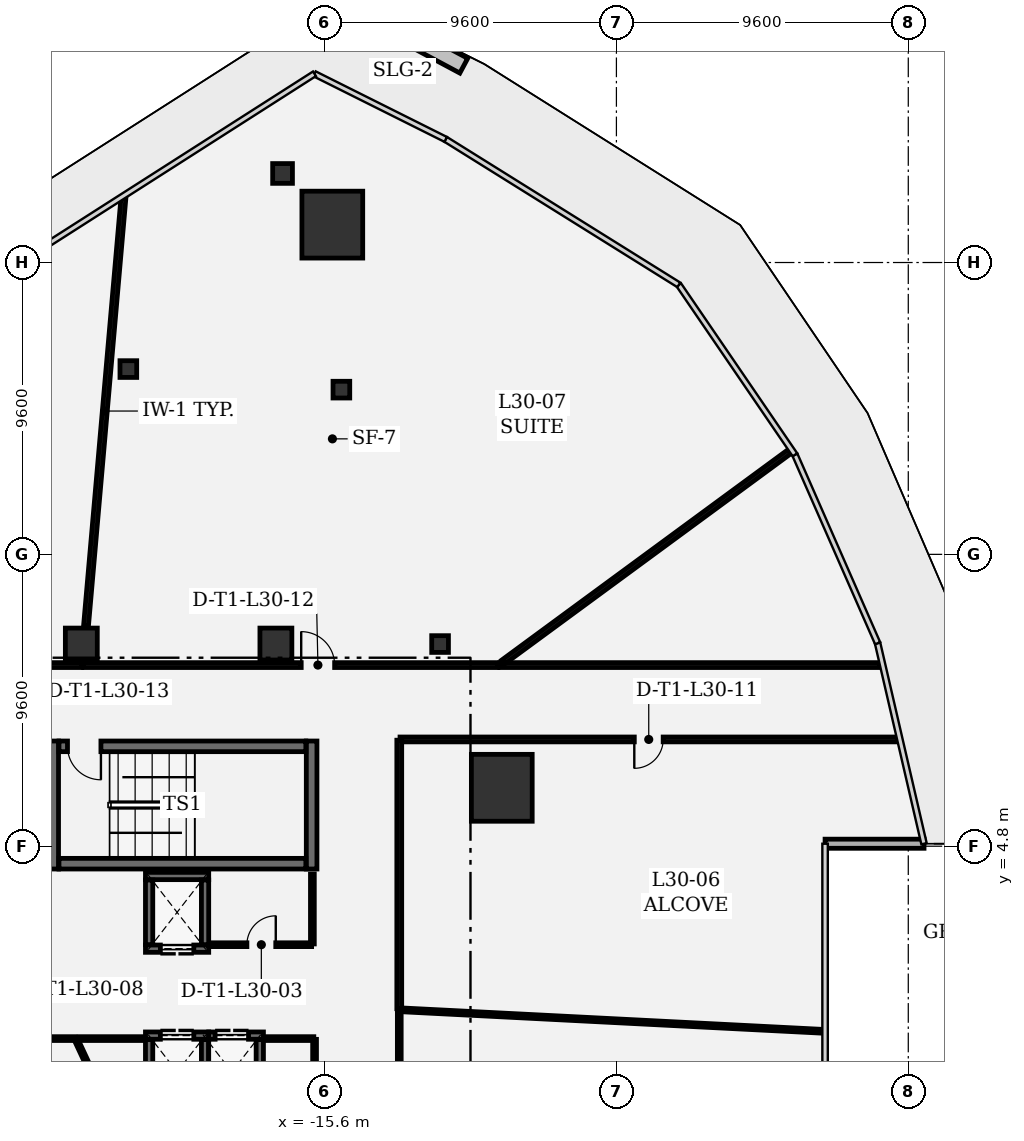
"""IFC4 building model, lengths in metres.
Left out: names, types, materials, properties, quantities, classifications, styles, units other than length and angle.
Written with IfcOpenShell. Run it as: python <this file> out.ifc"""

import sys

from ifc_helpers import new_model, si_unit, direction, frame, frame_2d, origin, origin_2d, place, context, subcontext, project, spatial, rectangle, extrude, element, fill, save


model = new_model("IFC4")
c1 = context("Model", 3, precision=1e-05, world=origin(), true_north=direction((0.0, 1.0)))
c2 = subcontext(c1, "Body", "Model", "MODEL_VIEW")
j1 = project(units=[si_unit("LENGTHUNIT", "METRE"), si_unit("PLANEANGLEUNIT", "RADIAN")], contexts=[c1])
p1 = place(None, origin())
s1 = spatial("IfcSite", under=j1, at=p1, CompositionType="ELEMENT")
p2 = place(p1, origin())
s2 = spatial("IfcBuilding", under=s1, at=p2, CompositionType="ELEMENT")
p3 = place(p2, frame((0.0, 0.0, 134.1)))
s3 = spatial("IfcBuildingStorey", under=s2, at=p3, CompositionType="ELEMENT", Elevation=134.1)
for number, where, z_axis, x_axis in (
    (1, (-9.77, 6.721, 0.0), (0.0, 0.0, 1.0), (1.0, 0.0, 0.0)),
    (2, (-15.344, 25.246, 0.0), (0.0, 0.0, 1.0), (1.0, 0.0, 0.0)),
):
    element("IfcColumn", number, at=place(p3, frame(where, z_axis=z_axis, x_axis=x_axis)), inside=s3, PredefinedType="COLUMN", context=c2, shape_type="SweptSolid", body=[
        extrude(rectangle(XDim=2.0, YDim=2.2, at=origin_2d()), origin(), (0.0, 0.0, 1.0), 4.05),
    ])
for number, where, z_axis, x_axis in (
    (3, (-23.6, 11.45, 0.0), (0.0, 0.0, 1.0), (1.0, 0.0, 0.0)),
    (4, (-17.2, 11.45, 0.0), (0.0, 0.0, 1.0), (1.0, 0.0, 0.0)),
):
    element("IfcColumn", number, at=place(p3, frame(where, z_axis=z_axis, x_axis=x_axis)), inside=s3, PredefinedType="COLUMN", context=c2, shape_type="SweptSolid", body=[
        extrude(rectangle(XDim=1.05, YDim=1.05, at=origin_2d()), origin(), (0.0, 0.0, 1.0), 4.05),
    ])
p4 = place(p3, frame((-16.981, 26.929, 0.0), z_axis=(0.0, 0.0, 1.0), x_axis=(1.0, 0.0, 0.0)))
e5 = element("IfcColumn", 5, at=p4, inside=s3, PredefinedType="COLUMN", context=c2, shape_type="SweptSolid", body=[
    extrude(rectangle(XDim=0.65, YDim=0.65, at=origin_2d()), origin(), (0.0, 0.0, 1.0), 4.05),
])
for number, where, z_axis, x_axis in (
    (6, (-22.053, 20.495, 0.0), (0.0, 0.0, 1.0), (1.0, 0.0, 0.0)),
    (7, (-15.046, 19.818, 0.0), (0.0, 0.0, 1.0), (1.0, 0.0, 0.0)),
    (8, (-11.8, 11.45, 0.0), (0.0, 0.0, 1.0), (1.0, 0.0, 0.0)),
):
    element("IfcColumn", number, at=place(p3, frame(where, z_axis=z_axis, x_axis=x_axis)), inside=s3, PredefinedType="COLUMN", context=c2, shape_type="SweptSolid", body=[
        extrude(rectangle(XDim=0.55, YDim=0.55, at=origin_2d()), origin(), (0.0, 0.0, 1.0), 4.05),
    ])
p5 = place(p3, frame((0.863, 4.882, 0.0), z_axis=(0.0, 0.0, 1.0), x_axis=(1.0, 0.0, 0.0)))
e9 = element("IfcWall", 9, at=p5, inside=s3, PredefinedType="SOLIDWALL", context=c2, shape_type="SweptSolid", body=[
    extrude(rectangle(XDim=3.254, YDim=0.3, at=frame_2d((1.627, 0.0))), origin(), (0.0, 0.0, 1.0), 3.78),
])
for number, where, z_axis, x_axis in (
    (10, (-24.525, 8.26, 0.0), (0.0, 0.0, 1.0), (0.0, -1.0, 0.0)),
    (11, (-16.025, 4.05, 0.0), (0.0, 0.0, 1.0), (0.0, 1.0, 0.0)),
):
    element("IfcWall", number, at=place(p3, frame(where, z_axis=z_axis, x_axis=x_axis)), inside=s3, PredefinedType="SHEAR", context=c2, shape_type="SweptSolid", body=[
        extrude(rectangle(XDim=4.21, YDim=0.35, at=frame_2d((2.105, 0.0))), origin(), (0.0, 0.0, 1.0), 3.78),
    ])
p6 = place(p3, frame((-24.335, 4.225, 0.0), z_axis=(0.0, 0.0, 1.0), x_axis=(1.0, 0.0, 0.0)))
e12 = element("IfcWall", 12, at=p6, inside=s3, PredefinedType="SHEAR", context=c2, shape_type="SweptSolid", body=[
    extrude(rectangle(XDim=8.12, YDim=0.35, at=frame_2d((4.06, 0.0))), origin(), (0.0, 0.0, 1.0), 3.78),
])
p7 = place(p3, frame((-16.215, 8.085, 0.0), z_axis=(0.0, 0.0, 1.0), x_axis=(-1.0, 0.0, 0.0)))
e13 = element("IfcWall", 13, at=p7, inside=s3, PredefinedType="SHEAR", context=c2, shape_type="SweptSolid", body=[
    extrude(rectangle(XDim=8.12, YDim=0.35, at=frame_2d((4.06, 0.0))), origin(), (0.0, 0.0, 1.0), 3.78),
])
p8 = place(p7, frame((6.74, 0.0, 0.0)))
e14 = element("IfcOpeningElement", 14, at=p8, cuts=e13, PredefinedType="OPENING", context=c2, shape_type="SweptSolid", body=[
    extrude(rectangle(XDim=1.1, YDim=2.2, at=frame_2d((0.55, 1.1))), frame((0.0, 0.185, 0.0), z_axis=(0.0, -1.0, 0.0), x_axis=(1.0, 0.0, 0.0)), (0.0, 0.0, 1.0), 0.37),
])
p9 = place(p3, frame((-19.41, 1.43, 0.0), z_axis=(0.0, 0.0, 1.0), x_axis=(-1.0, 0.0, 0.0)))
e15 = element("IfcWall", 15, at=p9, inside=s3, PredefinedType="SHEAR", context=c2, shape_type="SweptSolid", body=[
    extrude(rectangle(XDim=2.08, YDim=0.24, at=frame_2d((1.04, 0.0))), origin(), (0.0, 0.0, 1.0), 3.78),
])
p10 = place(p9, frame((0.49, 0.0, 0.0)))
e16 = element("IfcOpeningElement", 16, at=p10, cuts=e15, PredefinedType="OPENING", context=c2, shape_type="SweptSolid", body=[
    extrude(rectangle(XDim=1.1, YDim=2.2, at=frame_2d((0.55, 1.1))), frame((0.0, 0.13, 0.0), z_axis=(0.0, -1.0, 0.0), x_axis=(1.0, 0.0, 0.0)), (0.0, 0.0, 1.0), 0.26),
])
p11 = place(p3, frame((-21.49, 3.82, 0.0), z_axis=(0.0, 0.0, 1.0), x_axis=(1.0, 0.0, 0.0)))
e17 = element("IfcWall", 17, at=p11, inside=s3, PredefinedType="SHEAR", context=c2, shape_type="SweptSolid", body=[
    extrude(rectangle(XDim=2.08, YDim=0.24, at=frame_2d((1.04, 0.0))), origin(), (0.0, 0.0, 1.0), 3.78),
])
for number, where, z_axis, x_axis in (
    (18, (-21.37, 1.562, 0.0), (0.0, 0.0, 1.0), (0.0, 1.0, 0.0)),
    (19, (-19.53, 3.688, 0.0), (0.0, 0.0, 1.0), (0.0, -1.0, 0.0)),
):
    element("IfcWall", number, at=place(p3, frame(where, z_axis=z_axis, x_axis=x_axis)), inside=s3, PredefinedType="SHEAR", context=c2, shape_type="SweptSolid", body=[
        extrude(rectangle(XDim=2.126, YDim=0.24, at=frame_2d((1.063, 0.0))), origin(), (0.0, 0.0, 1.0), 3.78),
    ])
p12 = place(p3, frame((-21.49, -1.43, 0.0), z_axis=(0.0, 0.0, 1.0), x_axis=(1.0, 0.0, 0.0)))
e20 = element("IfcWall", 20, at=p12, inside=s3, PredefinedType="SHEAR", context=c2, shape_type="SweptSolid", body=[
    extrude(rectangle(XDim=2.08, YDim=0.24, at=frame_2d((1.04, 0.0))), origin(), (0.0, 0.0, 1.0), 3.78),
])
p13 = place(p12, frame((0.49, 0.0, 0.0)))
e21 = element("IfcOpeningElement", 21, at=p13, cuts=e20, PredefinedType="OPENING", context=c2, shape_type="SweptSolid", body=[
    extrude(rectangle(XDim=1.1, YDim=2.2, at=frame_2d((0.55, 1.1))), frame((0.0, 0.13, 0.0), z_axis=(0.0, -1.0, 0.0), x_axis=(1.0, 0.0, 0.0)), (0.0, 0.0, 1.0), 0.26),
])
for number, where, z_axis, x_axis in (
    (22, (-21.37, -3.688, 0.0), (0.0, 0.0, 1.0), (0.0, 1.0, 0.0)),
    (23, (-19.53, -1.562, 0.0), (0.0, 0.0, 1.0), (0.0, -1.0, 0.0)),
):
    element("IfcWall", number, at=place(p3, frame(where, z_axis=z_axis, x_axis=x_axis)), inside=s3, PredefinedType="SHEAR", context=c2, shape_type="SweptSolid", body=[
        extrude(rectangle(XDim=2.126, YDim=0.24, at=frame_2d((1.063, 0.0))), origin(), (0.0, 0.0, 1.0), 3.78),
    ])
p14 = place(p3, frame((-19.41, -1.43, 0.0), z_axis=(0.0, 0.0, 1.0), x_axis=(1.0, 0.0, 0.0)))
e24 = element("IfcWall", 24, at=p14, inside=s3, PredefinedType="SHEAR", context=c2, shape_type="SweptSolid", body=[
    extrude(rectangle(XDim=1.8, YDim=0.24, at=frame_2d((0.9, 0.0))), origin(), (0.0, 0.0, 1.0), 3.78),
])
p15 = place(p14, frame((0.21, 0.0, 0.0)))
e25 = element("IfcOpeningElement", 25, at=p15, cuts=e24, PredefinedType="OPENING", context=c2, shape_type="SweptSolid", body=[
    extrude(rectangle(XDim=1.1, YDim=2.2, at=frame_2d((0.55, 1.1))), frame((0.0, 0.13, 0.0), z_axis=(0.0, -1.0, 0.0), x_axis=(1.0, 0.0, 0.0)), (0.0, 0.0, 1.0), 0.26),
])
p16 = place(p3, frame((-17.73, -1.562, 0.0), z_axis=(0.0, 0.0, 1.0), x_axis=(0.0, -1.0, 0.0)))
e26 = element("IfcWall", 26, at=p16, inside=s3, PredefinedType="SHEAR", context=c2, shape_type="SweptSolid", body=[
    extrude(rectangle(XDim=2.126, YDim=0.24, at=frame_2d((1.063, 0.0))), origin(), (0.0, 0.0, 1.0), 3.78),
])
p17 = place(p3, frame((-19.334, 1.56, 0.0), z_axis=(0.0, 0.0, 1.0), x_axis=(1.0, 0.0, 0.0)))
e27 = element("IfcWall", 27, at=p17, inside=s3, PredefinedType="PARTITIONING", context=c2, shape_type="SweptSolid", body=[
    extrude(rectangle(XDim=3.309, YDim=0.125, at=frame_2d((1.654, 0.0))), origin(), (0.0, 0.0, 1.0), 3.78),
])
p18 = place(p17, frame((1.179, 0.0, 0.0)))
e28 = element("IfcOpeningElement", 28, at=p18, cuts=e27, PredefinedType="OPENING", context=c2, shape_type="SweptSolid", body=[
    extrude(rectangle(XDim=0.95, YDim=2.15, at=frame_2d((0.475, 1.075))), frame((0.0, 0.073, 0.0), z_axis=(0.0, -1.0, 0.0), x_axis=(1.0, 0.0, 0.0)), (0.0, 0.0, 1.0), 0.145),
])
p19 = place(p3, frame((-16.0, 1.585, 0.0), z_axis=(0.0, 0.0, 1.0), x_axis=(0.0, 1.0, 0.0)))
e29 = element("IfcWall", 29, at=p19, inside=s3, PredefinedType="PARTITIONING", context=c2, shape_type="SweptSolid", body=[
    extrude(rectangle(XDim=2.302, YDim=0.125, at=frame_2d((1.151, 0.0))), origin(), (0.0, 0.0, 1.0), 3.78),
])
p20 = place(p3, frame((-23.584, 10.758, 0.0), z_axis=(0.0, 0.0, 1.0), x_axis=(-1.0, 0.0, 0.0)))
e30 = element("IfcWall", 30, at=p20, inside=s3, PredefinedType="PARTITIONING", context=c2, shape_type="SweptSolid", body=[
    extrude(rectangle(XDim=14.249, YDim=0.16, at=frame_2d((7.125, 0.0))), origin(), (0.0, 0.0, 1.0), 3.344),
])
p21 = place(p20, frame((6.575, 0.0, 0.0)))
e31 = element("IfcOpeningElement", 31, at=p21, cuts=e30, PredefinedType="OPENING", context=c2, shape_type="SweptSolid", body=[
    extrude(rectangle(XDim=1.1, YDim=2.15, at=frame_2d((0.55, 1.075))), frame((0.0, 0.09, 0.0), z_axis=(0.0, -1.0, 0.0), x_axis=(1.0, 0.0, 0.0)), (0.0, 0.0, 1.0), 0.18),
])
p22 = place(p3, frame((-23.447, 12.04, 0.0), z_axis=(0.0, 0.0, 1.0), x_axis=(0.087151517994, 0.996195067701, 0.0)))
e32 = element("IfcWall", 32, at=p22, inside=s3, PredefinedType="PARTITIONING", context=c2, shape_type="SweptSolid", body=[
    extrude(rectangle(XDim=14.13, YDim=0.16, at=frame_2d((7.065, 0.0))), origin(), (0.0, 0.0, 1.0), 2.895),
])
p23 = place(p3, frame((-23.812, -1.528, 0.0), z_axis=(0.0, 0.0, 1.0), x_axis=(-1.0, 0.0, 0.0)))
e33 = element("IfcWall", 33, at=p23, inside=s3, PredefinedType="PARTITIONING", context=c2, shape_type="SweptSolid", body=[
    extrude(rectangle(XDim=2.673, YDim=0.125, at=frame_2d((1.336, 0.0))), origin(), (0.0, 0.0, 1.0), 3.78),
])
p24 = place(p23, frame((0.861, 0.0, 0.0)))
e34 = element("IfcOpeningElement", 34, at=p24, cuts=e33, PredefinedType="OPENING", context=c2, shape_type="SweptSolid", body=[
    extrude(rectangle(XDim=0.95, YDim=2.15, at=frame_2d((0.475, 1.075))), frame((0.0, 0.073, 0.0), z_axis=(0.0, -1.0, 0.0), x_axis=(1.0, 0.0, 0.0)), (0.0, 0.0, 1.0), 0.145),
])
p25 = place(p3, frame((-22.53, -4.224, 0.0), z_axis=(0.0, 0.0, 1.0), x_axis=(-0.422717831819, 0.906261350088, 0.0)))
e35 = element("IfcWall", 35, at=p25, inside=s3, PredefinedType="PARTITIONING", context=c2, shape_type="SweptSolid", body=[
    extrude(rectangle(XDim=2.95, YDim=0.125, at=frame_2d((1.475, 0.0))), origin(), (0.0, 0.0, 1.0), 3.78),
])
p26 = place(p3, frame((0.783, -1.288, 0.0), z_axis=(0.0, 0.0, 1.0), x_axis=(-0.998704516963, 0.050885044939, 0.0)))
e36 = element("IfcWall", 36, at=p26, inside=s3, PredefinedType="PARTITIONING", context=c2, shape_type="SweptSolid", body=[
    extrude(rectangle(XDim=13.919, YDim=0.125, at=frame_2d((6.959, 0.0))), origin(), (0.0, 0.0, 1.0), 3.78),
])
p27 = place(p3, frame((-13.142, -0.604, 0.0), z_axis=(0.0, 0.0, 1.0), x_axis=(0.0, -1.0, 0.0)))
e37 = element("IfcWall", 37, at=p27, inside=s3, PredefinedType="PARTITIONING", context=c2, shape_type="SweptSolid", body=[
    extrude(rectangle(XDim=10.33, YDim=0.125, at=frame_2d((5.165, 0.0))), origin(), (0.0, 0.0, 1.0), 3.78),
])
p28 = place(p27, frame((4.69, 0.0, 0.0)))
e38 = element("IfcOpeningElement", 38, at=p28, cuts=e37, PredefinedType="OPENING", context=c2, shape_type="SweptSolid", body=[
    extrude(rectangle(XDim=0.95, YDim=2.15, at=frame_2d((0.475, 1.075))), frame((0.0, 0.073, 0.0), z_axis=(0.0, -1.0, 0.0), x_axis=(1.0, 0.0, 0.0)), (0.0, 0.0, 1.0), 0.145),
])
p29 = place(p3, frame((-15.928, -4.214, 0.0), z_axis=(0.0, 0.0, 1.0), x_axis=(0.0, 1.0, 0.0)))
e39 = element("IfcWall", 39, at=p29, inside=s3, PredefinedType="PARTITIONING", context=c2, shape_type="SweptSolid", body=[
    extrude(rectangle(XDim=2.661, YDim=0.125, at=frame_2d((1.331, 0.0))), origin(), (0.0, 0.0, 1.0), 3.78),
])
p30 = place(p29, frame((0.855, 0.0, 0.0)))
e40 = element("IfcOpeningElement", 40, at=p30, cuts=e39, PredefinedType="OPENING", context=c2, shape_type="SweptSolid", body=[
    extrude(rectangle(XDim=0.95, YDim=2.15, at=frame_2d((0.475, 1.075))), frame((0.0, 0.073, 0.0), z_axis=(0.0, -1.0, 0.0), x_axis=(1.0, 0.0, 0.0)), (0.0, 0.0, 1.0), 0.145),
])
p31 = place(p3, frame((-15.953, -1.528, 0.0), z_axis=(0.0, 0.0, 1.0), x_axis=(-1.0, 0.0, 0.0)))
e41 = element("IfcWall", 41, at=p31, inside=s3, PredefinedType="PARTITIONING", context=c2, shape_type="SweptSolid", body=[
    extrude(rectangle(XDim=1.532, YDim=0.125, at=frame_2d((0.766, 0.0))), origin(), (0.0, 0.0, 1.0), 3.78),
])
p32 = place(p3, frame((-21.615, -1.528, 0.0), z_axis=(0.0, 0.0, 1.0), x_axis=(-1.0, 0.0, 0.0)))
e42 = element("IfcWall", 42, at=p32, inside=s3, PredefinedType="PARTITIONING", context=c2, shape_type="SweptSolid", body=[
    extrude(rectangle(XDim=2.054, YDim=0.125, at=frame_2d((1.027, 0.0))), origin(), (0.0, 0.0, 1.0), 3.78),
])
p33 = place(p3, frame((2.678, 10.758, 0.0), z_axis=(0.0, 0.0, 1.0), x_axis=(-1.0, 0.0, 0.0)))
e43 = element("IfcWall", 43, at=p33, inside=s3, PredefinedType="PARTITIONING", context=c2, shape_type="SweptSolid", body=[
    extrude(rectangle(XDim=12.514, YDim=0.16, at=frame_2d((6.257, 0.0))), origin(), (0.0, 0.0, 1.0), 3.78),
])
p34 = place(p3, frame((3.244, 8.312, 0.0), z_axis=(0.0, 0.0, 1.0), x_axis=(-1.0, 0.0, 0.0)))
e44 = element("IfcWall", 44, at=p34, inside=s3, PredefinedType="PARTITIONING", context=c2, shape_type="SweptSolid", body=[
    extrude(rectangle(XDim=16.361, YDim=0.16, at=frame_2d((8.181, 0.0))), origin(), (0.0, 0.0, 1.0), 2.895),
])
p35 = place(p34, frame((7.706, 0.0, 0.0)))
e45 = element("IfcOpeningElement", 45, at=p35, cuts=e44, PredefinedType="OPENING", context=c2, shape_type="SweptSolid", body=[
    extrude(rectangle(XDim=0.95, YDim=2.15, at=frame_2d((0.475, 1.075))), frame((0.0, 0.09, 0.0), z_axis=(0.0, -1.0, 0.0), x_axis=(1.0, 0.0, 0.0)), (0.0, 0.0, 1.0), 0.18),
])
p36 = place(p3, frame((-13.142, 8.287, 0.0), z_axis=(0.0, 0.0, 1.0), x_axis=(0.0, -1.0, 0.0)))
e46 = element("IfcWall", 46, at=p36, inside=s3, PredefinedType="PARTITIONING", context=c2, shape_type="SweptSolid", body=[
    extrude(rectangle(XDim=8.833, YDim=0.16, at=frame_2d((4.417, 0.0))), origin(), (0.0, 0.0, 1.0), 3.78),
])
p37 = place(p3, frame((-0.3, 17.785, 0.0), z_axis=(0.0, 0.0, 1.0), x_axis=(-0.805812705696, -0.592170485029, 0.0)))
e47 = element("IfcWall", 47, at=p37, inside=s3, PredefinedType="PARTITIONING", context=c2, shape_type="SweptSolid", body=[
    extrude(rectangle(XDim=11.697, YDim=0.16, at=frame_2d((5.849, 0.0))), origin(), (0.0, 0.0, 1.0), 3.78),
])
p38 = place(p3, frame((-23.526, 10.758, 0.0), z_axis=(0.0, 0.0, 1.0), x_axis=(1.0, 0.0, 0.0)))
e48 = element("IfcWall", 48, at=p38, inside=s3, PredefinedType="PARTITIONING", context=c2, shape_type="SweptSolid", body=[
    extrude(rectangle(XDim=13.626, YDim=0.16, at=frame_2d((6.813, 0.0))), origin(), (0.0, 0.0, 1.0), 2.895),
])
p39 = place(p38, frame((7.158, 0.0, 0.0)))
e49 = element("IfcOpeningElement", 49, at=p39, cuts=e48, PredefinedType="OPENING", context=c2, shape_type="SweptSolid", body=[
    extrude(rectangle(XDim=1.1, YDim=2.15, at=frame_2d((0.55, 1.075))), frame((0.0, 0.09, 0.0), z_axis=(0.0, -1.0, 0.0), x_axis=(1.0, 0.0, 0.0)), (0.0, 0.0, 1.0), 0.18),
])
p40 = place(p8, origin())
e50 = element("IfcDoor", 50, at=p40, inside=s3, OperationType="SINGLE_SWING_LEFT", PredefinedType="DOOR", context=c2, shape_type="SweptSolid", body=[
    extrude(rectangle(XDim=1.1, YDim=2.2, at=frame_2d((0.55, 1.1))), frame((0.0, 0.025, 0.0), z_axis=(0.0, -1.0, 0.0), x_axis=(1.0, 0.0, 0.0)), (0.0, 0.0, 1.0), 0.05),
])
fill(e14, e50)
p41 = place(p10, origin())
e51 = element("IfcDoor", 51, at=p41, inside=s3, OperationType="DOUBLE_DOOR_SLIDING", PredefinedType="DOOR", context=c2, shape_type="SweptSolid", body=[
    extrude(rectangle(XDim=1.1, YDim=2.2, at=frame_2d((0.55, 1.1))), frame((0.0, 0.025, 0.0), z_axis=(0.0, -1.0, 0.0), x_axis=(1.0, 0.0, 0.0)), (0.0, 0.0, 1.0), 0.05),
])
fill(e16, e51)
p42 = place(p13, origin())
e52 = element("IfcDoor", 52, at=p42, inside=s3, OperationType="DOUBLE_DOOR_SLIDING", PredefinedType="DOOR", context=c2, shape_type="SweptSolid", body=[
    extrude(rectangle(XDim=1.1, YDim=2.2, at=frame_2d((0.55, 1.1))), frame((0.0, 0.025, 0.0), z_axis=(0.0, -1.0, 0.0), x_axis=(1.0, 0.0, 0.0)), (0.0, 0.0, 1.0), 0.05),
])
fill(e21, e52)
p43 = place(p15, origin())
e53 = element("IfcDoor", 53, at=p43, inside=s3, OperationType="DOUBLE_DOOR_SLIDING", PredefinedType="DOOR", context=c2, shape_type="SweptSolid", body=[
    extrude(rectangle(XDim=1.1, YDim=2.2, at=frame_2d((0.55, 1.1))), frame((0.0, 0.025, 0.0), z_axis=(0.0, -1.0, 0.0), x_axis=(1.0, 0.0, 0.0)), (0.0, 0.0, 1.0), 0.05),
])
fill(e25, e53)
p44 = place(p18, origin())
e54 = element("IfcDoor", 54, at=p44, inside=s3, OperationType="SINGLE_SWING_RIGHT", PredefinedType="DOOR", context=c2, shape_type="SweptSolid", body=[
    extrude(rectangle(XDim=0.95, YDim=2.15, at=frame_2d((0.475, 1.075))), frame((0.0, 0.025, 0.0), z_axis=(0.0, -1.0, 0.0), x_axis=(1.0, 0.0, 0.0)), (0.0, 0.0, 1.0), 0.05),
])
fill(e28, e54)
p45 = place(p35, origin())
e55 = element("IfcDoor", 55, at=p45, inside=s3, OperationType="SINGLE_SWING_RIGHT", PredefinedType="DOOR", context=c2, shape_type="SweptSolid", body=[
    extrude(rectangle(XDim=0.95, YDim=2.15, at=frame_2d((0.475, 1.075))), frame((0.0, 0.025, 0.0), z_axis=(0.0, -1.0, 0.0), x_axis=(1.0, 0.0, 0.0)), (0.0, 0.0, 1.0), 0.05),
])
fill(e45, e55)
p46 = place(p39, origin())
e56 = element("IfcDoor", 56, at=p46, inside=s3, OperationType="SINGLE_SWING_LEFT", PredefinedType="DOOR", context=c2, shape_type="SweptSolid", body=[
    extrude(rectangle(XDim=1.1, YDim=2.15, at=frame_2d((0.55, 1.075))), frame((0.0, 0.025, 0.0), z_axis=(0.0, -1.0, 0.0), x_axis=(1.0, 0.0, 0.0)), (0.0, 0.0, 1.0), 0.05),
])
fill(e49, e56)
save(model, sys.argv[1])
